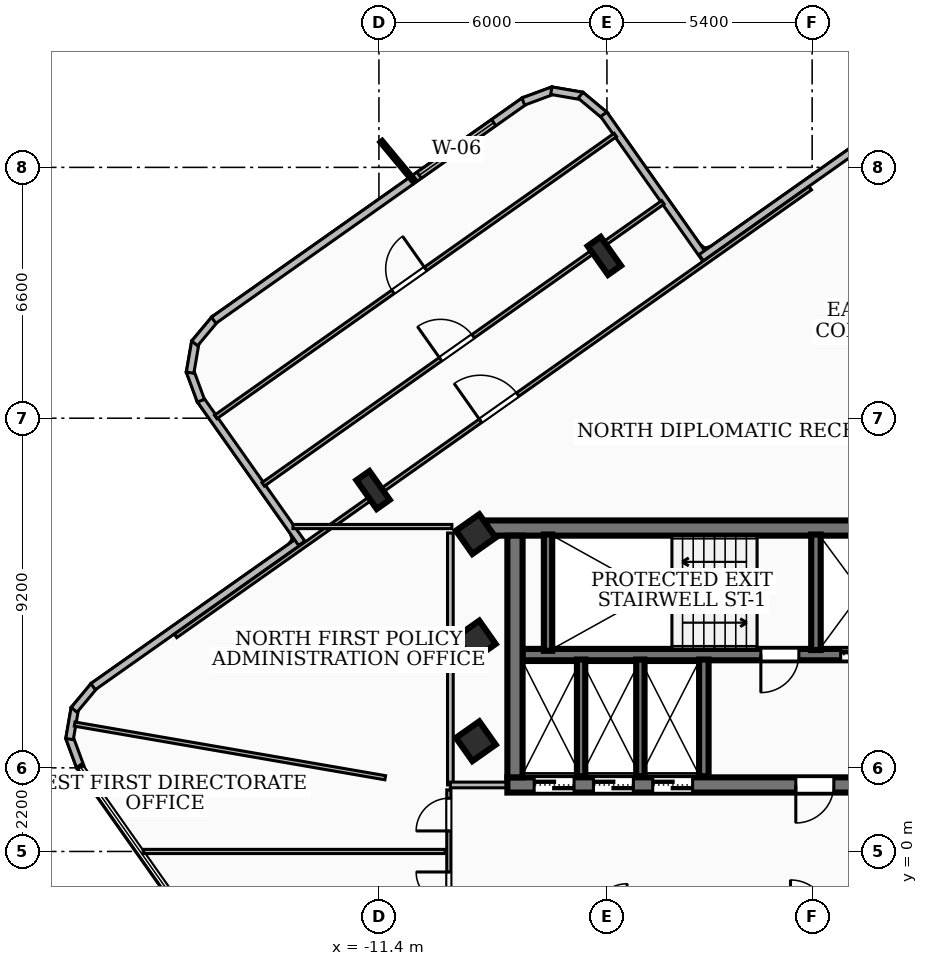
"""IFC4 building model, lengths in metres.
Left out: names, types, materials, properties, quantities, classifications, styles, units other than length and angle.
Written with IfcOpenShell. Run it as: python <this file> out.ifc"""

import sys

from ifc_helpers import new_model, si_unit, direction, frame, frame_2d, origin, origin_2d, place, context, subcontext, project, spatial, rectangle, i_section, extrude, element, fill, save


model = new_model("IFC4")
c1 = context("Model", 3, precision=1e-05, world=origin(), true_north=direction((0.0, 1.0)))
c2 = subcontext(c1, "Body", "Model", "MODEL_VIEW")
j1 = project(units=[si_unit("LENGTHUNIT", "METRE"), si_unit("PLANEANGLEUNIT", "RADIAN")], contexts=[c1])
p1 = place(None, origin())
s1 = spatial("IfcSite", under=j1, at=p1, CompositionType="ELEMENT")
p2 = place(p1, origin())
s2 = spatial("IfcBuilding", under=s1, at=p2, CompositionType="ELEMENT")
p3 = place(p2, frame((0.0, 0.0, 222.3)))
s3 = spatial("IfcBuildingStorey", under=s2, at=p3, CompositionType="ELEMENT", Elevation=222.3)
p4 = place(p3, frame((-8.78, 8.51, 0.0), z_axis=(0.0, 0.0, 1.0), x_axis=(1.0, 0.0, 0.0)))
e1 = element("IfcWall", 1, at=p4, inside=s3, PredefinedType="SHEAR", context=c2, shape_type="SweptSolid", body=[
    extrude(rectangle(XDim=17.56, YDim=0.4, at=frame_2d((8.78, 0.0))), origin(), (0.0, 0.0, 1.0), 3.14),
])
p5 = place(p3, frame((8.02, 1.75, 0.0), z_axis=(0.0, 0.0, 1.0), x_axis=(-1.0, 0.0, 0.0)))
e2 = element("IfcWall", 2, at=p5, inside=s3, PredefinedType="SHEAR", context=c2, shape_type="SweptSolid", body=[
    extrude(rectangle(XDim=16.04, YDim=0.4, at=frame_2d((8.02, 0.0))), origin(), (0.0, 0.0, 1.0), 3.14),
])
p6 = place(p5, frame((7.45, 0.0, 0.0)))
e3 = element("IfcOpeningElement", 3, at=p6, cuts=e2, PredefinedType="OPENING", context=c2, shape_type="SweptSolid", body=[
    extrude(rectangle(XDim=1.0, YDim=2.1, at=frame_2d((0.5, 1.05))), frame((0.0, 0.21, 0.0), z_axis=(0.0, -1.0, 0.0), x_axis=(1.0, 0.0, 0.0)), (0.0, 0.0, 1.0), 0.42),
])
p7 = place(p5, frame((14.285, 0.0, 0.0)))
e4 = element("IfcOpeningElement", 4, at=p7, cuts=e2, PredefinedType="OPENING", context=c2, shape_type="SweptSolid", body=[
    extrude(rectangle(XDim=1.05, YDim=2.15, at=frame_2d((0.525, 1.075))), frame((0.0, 0.21, 0.0), z_axis=(0.0, -1.0, 0.0), x_axis=(1.0, 0.0, 0.0)), (0.0, 0.0, 1.0), 0.42),
])
p8 = place(p5, frame((12.725, 0.0, 0.0)))
e5 = element("IfcOpeningElement", 5, at=p8, cuts=e2, PredefinedType="OPENING", context=c2, shape_type="SweptSolid", body=[
    extrude(rectangle(XDim=1.05, YDim=2.15, at=frame_2d((0.525, 1.075))), frame((0.0, 0.21, 0.0), z_axis=(0.0, -1.0, 0.0), x_axis=(1.0, 0.0, 0.0)), (0.0, 0.0, 1.0), 0.42),
])
p9 = place(p5, frame((11.165, 0.0, 0.0)))
e6 = element("IfcOpeningElement", 6, at=p9, cuts=e2, PredefinedType="OPENING", context=c2, shape_type="SweptSolid", body=[
    extrude(rectangle(XDim=1.05, YDim=2.15, at=frame_2d((0.525, 1.075))), frame((0.0, 0.21, 0.0), z_axis=(0.0, -1.0, 0.0), x_axis=(1.0, 0.0, 0.0)), (0.0, 0.0, 1.0), 0.42),
])
p10 = place(p5, frame((3.4, 0.0, 0.0)))
e7 = element("IfcOpeningElement", 7, at=p10, cuts=e2, PredefinedType="OPENING", context=c2, shape_type="SweptSolid", body=[
    extrude(rectangle(XDim=0.9, YDim=2.06, at=frame_2d((0.45, 1.03))), frame((0.0, 0.21, 0.0), z_axis=(0.0, -1.0, 0.0), x_axis=(1.0, 0.0, 0.0)), (0.0, 0.0, 1.0), 0.42),
])
p11 = place(p5, frame((1.1, 0.0, 0.0)))
e8 = element("IfcOpeningElement", 8, at=p11, cuts=e2, PredefinedType="OPENING", context=c2, shape_type="SweptSolid", body=[
    extrude(rectangle(XDim=0.9, YDim=2.06, at=frame_2d((0.45, 1.03))), frame((0.0, 0.21, 0.0), z_axis=(0.0, -1.0, 0.0), x_axis=(1.0, 0.0, 0.0)), (0.0, 0.0, 1.0), 0.42),
])
p12 = place(p3, frame((-7.82, 1.95, 0.0), z_axis=(0.0, 0.0, 1.0), x_axis=(0.0, 1.0, 0.0)))
e9 = element("IfcWall", 9, at=p12, inside=s3, PredefinedType="SHEAR", context=c2, shape_type="SweptSolid", body=[
    extrude(rectangle(XDim=6.36, YDim=0.4, at=frame_2d((3.18, 0.0))), origin(), (0.0, 0.0, 1.0), 3.14),
])
p13 = place(p3, frame((7.62, 5.18, 0.0), z_axis=(0.0, 0.0, 1.0), x_axis=(-1.0, 0.0, 0.0)))
e10 = element("IfcWall", 10, at=p13, inside=s3, PredefinedType="SOLIDWALL", context=c2, shape_type="SweptSolid", body=[
    extrude(rectangle(XDim=15.24, YDim=0.3, at=frame_2d((7.62, 0.0))), origin(), (0.0, 0.0, 1.0), 3.14),
])
p14 = place(p13, frame((5.77, 0.0, 0.0)))
e11 = element("IfcOpeningElement", 11, at=p14, cuts=e10, PredefinedType="OPENING", context=c2, shape_type="SweptSolid", body=[
    extrude(rectangle(XDim=1.1, YDim=2.15, at=frame_2d((0.55, 1.075))), frame((0.0, 0.16, 0.0), z_axis=(0.0, -1.0, 0.0), x_axis=(1.0, 0.0, 0.0)), (0.0, 0.0, 1.0), 0.32),
])
p15 = place(p13, frame((2.97, 0.0, 0.0)))
e12 = element("IfcOpeningElement", 12, at=p15, cuts=e10, PredefinedType="OPENING", context=c2, shape_type="SweptSolid", body=[
    extrude(rectangle(XDim=1.1, YDim=2.15, at=frame_2d((0.55, 1.075))), frame((0.0, 0.16, 0.0), z_axis=(0.0, -1.0, 0.0), x_axis=(1.0, 0.0, 0.0)), (0.0, 0.0, 1.0), 0.32),
])
p16 = place(p13, frame((7.97, 0.0, 0.0)))
e13 = element("IfcOpeningElement", 13, at=p16, cuts=e10, PredefinedType="OPENING", context=c2, shape_type="SweptSolid", body=[
    extrude(rectangle(XDim=1.0, YDim=2.1, at=frame_2d((0.5, 1.05))), frame((0.0, 0.16, 0.0), z_axis=(0.0, -1.0, 0.0), x_axis=(1.0, 0.0, 0.0)), (0.0, 0.0, 1.0), 0.32),
])
p17 = place(p3, frame((-6.95, 5.28, 0.0), z_axis=(0.0, 0.0, 1.0), x_axis=(0.0, 1.0, 0.0)))
e14 = element("IfcWall", 14, at=p17, inside=s3, PredefinedType="SOLIDWALL", context=c2, shape_type="SweptSolid", body=[
    extrude(rectangle(XDim=3.06, YDim=0.22, at=frame_2d((1.53, 0.0))), origin(), (0.0, 0.0, 1.0), 3.14),
])
p18 = place(p3, frame((0.1, 5.3, 0.0), z_axis=(0.0, 0.0, 1.0), x_axis=(0.0, 1.0, 0.0)))
e15 = element("IfcWall", 15, at=p18, inside=s3, PredefinedType="SOLIDWALL", context=c2, shape_type="SweptSolid", body=[
    extrude(rectangle(XDim=3.04, YDim=0.25, at=frame_2d((1.52, 0.0))), origin(), (0.0, 0.0, 1.0), 3.14),
])
p19 = place(p3, frame((-2.85, 1.98, 0.0), z_axis=(0.0, 0.0, 1.0), x_axis=(0.0, 1.0, 0.0)))
e16 = element("IfcWall", 16, at=p19, inside=s3, PredefinedType="SOLIDWALL", context=c2, shape_type="SweptSolid", body=[
    extrude(rectangle(XDim=3.07, YDim=0.25, at=frame_2d((1.535, 0.0))), origin(), (0.0, 0.0, 1.0), 3.14),
])
for number, where, z_axis, x_axis in (
    (17, (-6.08, 1.98, 0.0), (0.0, 0.0, 1.0), (0.0, 1.0, 0.0)),
    (18, (-4.52, 1.98, 0.0), (0.0, 0.0, 1.0), (0.0, 1.0, 0.0)),
):
    element("IfcWall", number, at=place(p3, frame(where, z_axis=z_axis, x_axis=x_axis)), inside=s3, PredefinedType="SOLIDWALL", context=c2, shape_type="SweptSolid", body=[
        extrude(rectangle(XDim=3.07, YDim=0.22, at=frame_2d((1.535, 0.0))), origin(), (0.0, 0.0, 1.0), 3.14),
    ])
for number, where, z_axis, x_axis in (
    (19, (-8.85, 2.9, 0.0), (0.0, 0.0, 1.0), (0.817, 0.576, 0.0)),
    (20, (-8.85, 5.55, 0.0), (0.0, 0.0, 1.0), (0.817, 0.576, 0.0)),
    (21, (-8.85, 8.35, 0.0), (0.0, 0.0, 1.0), (0.817, 0.576, 0.0)),
):
    element("IfcColumn", number, at=place(p3, frame(where, z_axis=z_axis, x_axis=x_axis)), inside=s3, PredefinedType="COLUMN", context=c2, shape_type="SweptSolid", body=[
        extrude(rectangle(XDim=0.75, YDim=0.75, at=origin_2d()), origin(), (0.0, 0.0, 1.0), 3.42),
    ])
for number, where, z_axis, x_axis in (
    (22, (-5.468, 15.671, 0.0), (0.0, 0.0, 1.0), (0.817, 0.576, 0.0)),
    (23, (-11.554, 9.51, 0.0), (0.0, 0.0, 1.0), (0.817, 0.576, 0.0)),
):
    element("IfcColumn", number, at=place(p3, frame(where, z_axis=z_axis, x_axis=x_axis)), inside=s3, PredefinedType="COLUMN", context=c2, shape_type="SweptSolid", body=[
        extrude(i_section(OverallWidth=0.418, OverallDepth=0.927, WebThickness=0.019, FlangeThickness=0.032, at=origin_2d()), origin(), (0.0, 0.0, 1.0), 3.42),
    ])
p20 = place(p3, frame((-19.256, 2.219, 0.0), z_axis=(0.0, 0.0, 1.0), x_axis=(-0.345975487894, 0.938243551417, 0.0)))
e24 = element("IfcWall", 24, at=p20, inside=s3, PredefinedType="SOLIDWALL", context=c2, shape_type="SweptSolid", body=[
    extrude(rectangle(XDim=0.838, YDim=0.2, at=frame_2d((0.419, 0.0))), origin(), (0.0, 0.0, 1.0), 3.14),
])
p21 = place(p3, frame((-19.541, 2.957, 0.0), z_axis=(0.0, 0.0, 1.0), x_axis=(0.169867275979, 0.985466949497, 0.0)))
e25 = element("IfcWall", 25, at=p21, inside=s3, PredefinedType="SOLIDWALL", context=c2, shape_type="SweptSolid", body=[
    extrude(rectangle(XDim=0.825, YDim=0.2, at=frame_2d((0.413, 0.0))), origin(), (0.0, 0.0, 1.0), 3.14),
])
p22 = place(p3, frame((-19.421, 3.726, 0.0), z_axis=(0.0, 0.0, 1.0), x_axis=(0.639610986305, 0.768698761673, 0.0)))
e26 = element("IfcWall", 26, at=p22, inside=s3, PredefinedType="SOLIDWALL", context=c2, shape_type="SweptSolid", body=[
    extrude(rectangle(XDim=0.838, YDim=0.2, at=frame_2d((0.419, 0.0))), origin(), (0.0, 0.0, 1.0), 3.14),
])
p23 = place(p3, frame((-18.921, 4.337, 0.0), z_axis=(0.0, 0.0, 1.0), x_axis=(0.817167578816, 0.576400163196, 0.0)))
e27 = element("IfcWall", 27, at=p23, inside=s3, PredefinedType="SOLIDWALL", context=c2, shape_type="SweptSolid", body=[
    extrude(rectangle(XDim=6.74, YDim=0.2, at=frame_2d((3.37, 0.0))), origin(), (0.0, 0.0, 1.0), 3.14),
])
p24 = place(p3, frame((-13.432, 8.111, 0.0), z_axis=(0.0, 0.0, 1.0), x_axis=(-0.576445639344, 0.817135499707, 0.0)))
e28 = element("IfcWall", 28, at=p24, inside=s3, PredefinedType="SOLIDWALL", context=c2, shape_type="SweptSolid", body=[
    extrude(rectangle(XDim=4.641, YDim=0.2, at=frame_2d((2.32, 0.0))), origin(), (0.0, 0.0, 1.0), 3.14),
])
p25 = place(p3, frame((-16.084, 11.86, 0.0), z_axis=(0.0, 0.0, 1.0), x_axis=(-0.346232030844, 0.938148911857, 0.0)))
e29 = element("IfcWall", 29, at=p25, inside=s3, PredefinedType="SOLIDWALL", context=c2, shape_type="SweptSolid", body=[
    extrude(rectangle(XDim=0.838, YDim=0.2, at=frame_2d((0.419, 0.0))), origin(), (0.0, 0.0, 1.0), 3.14),
])
p26 = place(p3, frame((-16.369, 12.598, 0.0), z_axis=(0.0, 0.0, 1.0), x_axis=(0.169332910212, 0.985558910223, 0.0)))
e30 = element("IfcWall", 30, at=p26, inside=s3, PredefinedType="SOLIDWALL", context=c2, shape_type="SweptSolid", body=[
    extrude(rectangle(XDim=0.826, YDim=0.2, at=frame_2d((0.413, 0.0))), origin(), (0.0, 0.0, 1.0), 3.14),
])
p27 = place(p3, frame((-16.249, 13.368, 0.0), z_axis=(0.0, 0.0, 1.0), x_axis=(0.641043819012, 0.76750428149, 0.0)))
e31 = element("IfcWall", 31, at=p27, inside=s3, PredefinedType="SOLIDWALL", context=c2, shape_type="SweptSolid", body=[
    extrude(rectangle(XDim=0.838, YDim=0.2, at=frame_2d((0.419, 0.0))), origin(), (0.0, 0.0, 1.0), 3.14),
])
p28 = place(p3, frame((-15.748, 13.978, 0.0), z_axis=(0.0, 0.0, 1.0), x_axis=(0.817168991675, 0.576398160168, 0.0)))
e32 = element("IfcWall", 32, at=p28, inside=s3, PredefinedType="SOLIDWALL", context=c2, shape_type="SweptSolid", body=[
    extrude(rectangle(XDim=10.022, YDim=0.2, at=frame_2d((5.011, 0.0))), origin(), (0.0, 0.0, 1.0), 3.14),
])
p29 = place(p28, frame((6.618, 0.0, 0.85)))
e33 = element("IfcOpeningElement", 33, at=p29, cuts=e32, PredefinedType="OPENING", context=c2, shape_type="SweptSolid", body=[
    extrude(rectangle(XDim=2.4, YDim=1.85, at=frame_2d((1.2, 0.925))), frame((0.0, 0.11, 0.0), z_axis=(0.0, -1.0, 0.0), x_axis=(1.0, 0.0, 0.0)), (0.0, 0.0, 1.0), 0.22),
])
p30 = place(p3, frame((-7.601, 19.732, 0.0), z_axis=(0.0, 0.0, 1.0), x_axis=(0.937664324164, 0.347542249504, 0.0)))
e34 = element("IfcWall", 34, at=p30, inside=s3, PredefinedType="SOLIDWALL", context=c2, shape_type="SweptSolid", body=[
    extrude(rectangle(XDim=0.837, YDim=0.2, at=frame_2d((0.419, 0.0))), origin(), (0.0, 0.0, 1.0), 3.14),
])
p31 = place(p3, frame((-6.864, 20.018, 0.0), z_axis=(0.0, 0.0, 1.0), x_axis=(0.985501046628, -0.16966934636, 0.0)))
e35 = element("IfcWall", 35, at=p31, inside=s3, PredefinedType="SOLIDWALL", context=c2, shape_type="SweptSolid", body=[
    extrude(rectangle(XDim=0.826, YDim=0.2, at=frame_2d((0.413, 0.0))), origin(), (0.0, 0.0, 1.0), 3.14),
])
p32 = place(p3, frame((-6.094, 19.898, 0.0), z_axis=(0.0, 0.0, 1.0), x_axis=(0.767647650908, -0.640872127694, 0.0)))
e36 = element("IfcWall", 36, at=p32, inside=s3, PredefinedType="SOLIDWALL", context=c2, shape_type="SweptSolid", body=[
    extrude(rectangle(XDim=0.838, YDim=0.2, at=frame_2d((0.419, 0.0))), origin(), (0.0, 0.0, 1.0), 3.14),
])
p33 = place(p3, frame((-5.484, 19.397, 0.0), z_axis=(0.0, 0.0, 1.0), x_axis=(0.576451897958, -0.817131084551, 0.0)))
e37 = element("IfcWall", 37, at=p33, inside=s3, PredefinedType="SOLIDWALL", context=c2, shape_type="SweptSolid", body=[
    extrude(rectangle(XDim=4.642, YDim=0.2, at=frame_2d((2.321, 0.0))), origin(), (0.0, 0.0, 1.0), 3.14),
])
p34 = place(p3, frame((-2.919, 15.623, 0.0), z_axis=(0.0, 0.0, 1.0), x_axis=(0.817050016192, 0.576566796686, 0.0)))
e38 = element("IfcWall", 38, at=p34, inside=s3, PredefinedType="SOLIDWALL", context=c2, shape_type="SweptSolid", body=[
    extrude(rectangle(XDim=6.341, YDim=0.2, at=frame_2d((3.17, 0.0))), origin(), (0.0, 0.0, 1.0), 3.14),
])
p35 = place(p3, frame((-9.52, 1.75, 0.0), z_axis=(0.0, 0.0, 1.0), x_axis=(0.0, 1.0, 0.0)))
e39 = element("IfcWall", 39, at=p35, inside=s3, PredefinedType="PARTITIONING", context=c2, shape_type="SweptSolid", body=[
    extrude(rectangle(XDim=6.63, YDim=0.15, at=frame_2d((3.315, 0.0))), origin(), (0.0, 0.0, 1.0), 3.14),
])
p36 = place(p3, frame((-7.85, 1.75, 0.0), z_axis=(0.0, 0.0, 1.0), x_axis=(-1.0, 0.0, 0.0)))
e40 = element("IfcWall", 40, at=p36, inside=s3, PredefinedType="PARTITIONING", context=c2, shape_type="SweptSolid", body=[
    extrude(rectangle(XDim=1.67, YDim=0.15, at=frame_2d((0.835, 0.0))), origin(), (0.0, 0.0, 1.0), 2.37),
])
p37 = place(p3, frame((-17.604, 0.0, 0.0), z_axis=(0.0, 0.0, 1.0), x_axis=(1.0, 0.0, 0.0)))
e41 = element("IfcWall", 41, at=p37, inside=s3, PredefinedType="PARTITIONING", context=c2, shape_type="SweptSolid", body=[
    extrude(rectangle(XDim=7.944, YDim=0.11, at=frame_2d((3.972, 0.0))), origin(), (0.0, 0.0, 1.0), 3.14),
])
p38 = place(p3, frame((-13.662, 8.55, 0.0), z_axis=(0.0, 0.0, 1.0), x_axis=(1.0, 0.0, 0.0)))
e42 = element("IfcWall", 42, at=p38, inside=s3, PredefinedType="PARTITIONING", context=c2, shape_type="SweptSolid", body=[
    extrude(rectangle(XDim=4.182, YDim=0.11, at=frame_2d((2.091, 0.0))), origin(), (0.0, 0.0, 1.0), 2.51),
])
p39 = place(p3, frame((-9.56, -1.62, 0.0), z_axis=(0.0, 0.0, 1.0), x_axis=(0.0, 1.0, 0.0)))
e43 = element("IfcWall", 43, at=p39, inside=s3, PredefinedType="PARTITIONING", context=c2, shape_type="SweptSolid", body=[
    extrude(rectangle(XDim=3.24, YDim=0.11, at=frame_2d((1.62, 0.0))), origin(), (0.0, 0.0, 1.0), 3.14),
])
p40 = place(p39, frame((0.22, 0.0, 0.0)))
e44 = element("IfcOpeningElement", 44, at=p40, cuts=e43, PredefinedType="OPENING", context=c2, shape_type="SweptSolid", body=[
    extrude(rectangle(XDim=0.86, YDim=2.04, at=frame_2d((0.43, 1.02))), frame((0.0, 0.065, 0.0), z_axis=(0.0, -1.0, 0.0), x_axis=(1.0, 0.0, 0.0)), (0.0, 0.0, 1.0), 0.13),
])
p41 = place(p39, frame((2.16, 0.0, 0.0)))
e45 = element("IfcOpeningElement", 45, at=p41, cuts=e43, PredefinedType="OPENING", context=c2, shape_type="SweptSolid", body=[
    extrude(rectangle(XDim=0.86, YDim=2.04, at=frame_2d((0.43, 1.02))), frame((0.0, 0.065, 0.0), z_axis=(0.0, -1.0, 0.0), x_axis=(1.0, 0.0, 0.0)), (0.0, 0.0, 1.0), 0.13),
])
p42 = place(p3, frame((-11.234, 1.94, 0.0), z_axis=(0.0, 0.0, 1.0), x_axis=(-0.985400402951, 0.170252887973, 0.0)))
e46 = element("IfcWall", 46, at=p42, inside=s3, PredefinedType="PARTITIONING", context=c2, shape_type="SweptSolid", body=[
    extrude(rectangle(XDim=8.294, YDim=0.11, at=frame_2d((4.147, 0.0))), origin(), (0.0, 0.0, 1.0), 3.14),
])
p43 = place(p3, frame((-16.752, 5.671, 0.0), z_axis=(0.0, 0.0, 1.0), x_axis=(0.81715881447, 0.576412588285, 0.0)))
e47 = element("IfcWall", 47, at=p43, inside=s3, PredefinedType="PARTITIONING", context=c2, shape_type="SweptSolid", body=[
    extrude(rectangle(XDim=20.44, YDim=0.11, at=frame_2d((10.22, 0.0))), origin(), (0.0, 0.0, 1.0), 2.51),
])
p44 = place(p43, frame((9.82, 0.0, 0.0)))
e48 = element("IfcOpeningElement", 48, at=p44, cuts=e47, PredefinedType="OPENING", context=c2, shape_type="SweptSolid", body=[
    extrude(rectangle(XDim=1.2, YDim=2.1, at=frame_2d((0.6, 1.05))), frame((0.0, 0.065, 0.0), z_axis=(0.0, -1.0, 0.0), x_axis=(1.0, 0.0, 0.0)), (0.0, 0.0, 1.0), 0.13),
])
p45 = place(p3, frame((-14.445, 9.66, 0.0), z_axis=(0.0, 0.0, 1.0), x_axis=(0.817137627016, 0.576442623784, 0.0)))
e49 = element("IfcWall", 49, at=p45, inside=s3, PredefinedType="PARTITIONING", context=c2, shape_type="SweptSolid", body=[
    extrude(rectangle(XDim=12.871, YDim=0.11, at=frame_2d((6.435, 0.0))), origin(), (0.0, 0.0, 1.0), 3.14),
])
p46 = place(p45, frame((5.71, 0.0, 0.0)))
e50 = element("IfcOpeningElement", 50, at=p46, cuts=e49, PredefinedType="OPENING", context=c2, shape_type="SweptSolid", body=[
    extrude(rectangle(XDim=1.05, YDim=2.08, at=frame_2d((0.525, 1.04))), frame((0.0, 0.065, 0.0), z_axis=(0.0, -1.0, 0.0), x_axis=(1.0, 0.0, 0.0)), (0.0, 0.0, 1.0), 0.13),
])
p47 = place(p3, frame((-15.695, 11.433, 0.0), z_axis=(0.0, 0.0, 1.0), x_axis=(0.817121348165, 0.576465699216, 0.0)))
e51 = element("IfcWall", 51, at=p47, inside=s3, PredefinedType="PARTITIONING", context=c2, shape_type="SweptSolid", body=[
    extrude(rectangle(XDim=12.87, YDim=0.11, at=frame_2d((6.435, 0.0))), origin(), (0.0, 0.0, 1.0), 3.14),
])
p48 = place(p47, frame((5.709, 0.0, 0.0)))
e52 = element("IfcOpeningElement", 52, at=p48, cuts=e51, PredefinedType="OPENING", context=c2, shape_type="SweptSolid", body=[
    extrude(rectangle(XDim=1.05, YDim=2.08, at=frame_2d((0.525, 1.04))), frame((0.0, 0.065, 0.0), z_axis=(0.0, -1.0, 0.0), x_axis=(1.0, 0.0, 0.0)), (0.0, 0.0, 1.0), 0.13),
])
p49 = place(p29, origin())
e53 = element("IfcWindow", 53, at=p49, inside=s3, PartitioningType="SINGLE_PANEL", PredefinedType="WINDOW", context=c2, shape_type="SweptSolid", body=[
    extrude(rectangle(XDim=2.4, YDim=1.85, at=frame_2d((1.2, 0.925))), frame((0.0, 0.03, 0.0), z_axis=(0.0, -1.0, 0.0), x_axis=(1.0, 0.0, 0.0)), (0.0, 0.0, 1.0), 0.06),
])
fill(e33, e53)
p50 = place(p6, origin())
e54 = element("IfcDoor", 54, at=p50, inside=s3, OperationType="SINGLE_SWING_RIGHT", PredefinedType="DOOR", context=c2, shape_type="SweptSolid", body=[
    extrude(rectangle(XDim=1.0, YDim=2.1, at=frame_2d((0.5, 1.05))), frame((0.0, 0.025, 0.0), z_axis=(0.0, -1.0, 0.0), x_axis=(1.0, 0.0, 0.0)), (0.0, 0.0, 1.0), 0.05),
])
fill(e3, e54)
p51 = place(p14, origin())
e55 = element("IfcDoor", 55, at=p51, inside=s3, OperationType="DOUBLE_DOOR_SLIDING", PredefinedType="DOOR", context=c2, shape_type="SweptSolid", body=[
    extrude(rectangle(XDim=1.1, YDim=2.15, at=frame_2d((0.55, 1.075))), frame((0.0, 0.025, 0.0), z_axis=(0.0, -1.0, 0.0), x_axis=(1.0, 0.0, 0.0)), (0.0, 0.0, 1.0), 0.05),
])
fill(e11, e55)
p52 = place(p16, origin())
e56 = element("IfcDoor", 56, at=p52, inside=s3, OperationType="SINGLE_SWING_RIGHT", PredefinedType="DOOR", context=c2, shape_type="SweptSolid", body=[
    extrude(rectangle(XDim=1.0, YDim=2.1, at=frame_2d((0.5, 1.05))), frame((0.0, 0.025, 0.0), z_axis=(0.0, -1.0, 0.0), x_axis=(1.0, 0.0, 0.0)), (0.0, 0.0, 1.0), 0.05),
])
fill(e13, e56)
p53 = place(p7, origin())
e57 = element("IfcDoor", 57, at=p53, inside=s3, OperationType="DOUBLE_DOOR_SLIDING", PredefinedType="DOOR", context=c2, shape_type="SweptSolid", body=[
    extrude(rectangle(XDim=1.05, YDim=2.15, at=frame_2d((0.525, 1.075))), frame((0.0, 0.025, 0.0), z_axis=(0.0, -1.0, 0.0), x_axis=(1.0, 0.0, 0.0)), (0.0, 0.0, 1.0), 0.05),
])
fill(e4, e57)
p54 = place(p8, origin())
e58 = element("IfcDoor", 58, at=p54, inside=s3, OperationType="DOUBLE_DOOR_SLIDING", PredefinedType="DOOR", context=c2, shape_type="SweptSolid", body=[
    extrude(rectangle(XDim=1.05, YDim=2.15, at=frame_2d((0.525, 1.075))), frame((0.0, 0.025, 0.0), z_axis=(0.0, -1.0, 0.0), x_axis=(1.0, 0.0, 0.0)), (0.0, 0.0, 1.0), 0.05),
])
fill(e5, e58)
p55 = place(p9, origin())
e59 = element("IfcDoor", 59, at=p55, inside=s3, OperationType="DOUBLE_DOOR_SLIDING", PredefinedType="DOOR", context=c2, shape_type="SweptSolid", body=[
    extrude(rectangle(XDim=1.05, YDim=2.15, at=frame_2d((0.525, 1.075))), frame((0.0, 0.025, 0.0), z_axis=(0.0, -1.0, 0.0), x_axis=(1.0, 0.0, 0.0)), (0.0, 0.0, 1.0), 0.05),
])
fill(e6, e59)
p56 = place(p40, origin())
e60 = element("IfcDoor", 60, at=p56, inside=s3, OperationType="SINGLE_SWING_RIGHT", PredefinedType="DOOR", context=c2, shape_type="SweptSolid", body=[
    extrude(rectangle(XDim=0.86, YDim=2.04, at=frame_2d((0.43, 1.02))), frame((0.0, 0.025, 0.0), z_axis=(0.0, -1.0, 0.0), x_axis=(1.0, 0.0, 0.0)), (0.0, 0.0, 1.0), 0.05),
])
fill(e44, e60)
p57 = place(p41, origin())
e61 = element("IfcDoor", 61, at=p57, inside=s3, OperationType="SINGLE_SWING_LEFT", PredefinedType="DOOR", context=c2, shape_type="SweptSolid", body=[
    extrude(rectangle(XDim=0.86, YDim=2.04, at=frame_2d((0.43, 1.02))), frame((0.0, 0.025, 0.0), z_axis=(0.0, -1.0, 0.0), x_axis=(1.0, 0.0, 0.0)), (0.0, 0.0, 1.0), 0.05),
])
fill(e45, e61)
p58 = place(p44, origin())
e62 = element("IfcDoor", 62, at=p58, inside=s3, OperationType="SINGLE_SWING_LEFT", PredefinedType="DOOR", context=c2, shape_type="SweptSolid", body=[
    extrude(rectangle(XDim=1.2, YDim=2.1, at=frame_2d((0.6, 1.05))), frame((0.0, 0.025, 0.0), z_axis=(0.0, -1.0, 0.0), x_axis=(1.0, 0.0, 0.0)), (0.0, 0.0, 1.0), 0.05),
])
fill(e48, e62)
p59 = place(p46, origin())
e63 = element("IfcDoor", 63, at=p59, inside=s3, OperationType="SINGLE_SWING_LEFT", PredefinedType="DOOR", context=c2, shape_type="SweptSolid", body=[
    extrude(rectangle(XDim=1.05, YDim=2.08, at=frame_2d((0.525, 1.04))), frame((0.0, 0.025, 0.0), z_axis=(0.0, -1.0, 0.0), x_axis=(1.0, 0.0, 0.0)), (0.0, 0.0, 1.0), 0.05),
])
fill(e50, e63)
p60 = place(p48, origin())
e64 = element("IfcDoor", 64, at=p60, inside=s3, OperationType="SINGLE_SWING_RIGHT", PredefinedType="DOOR", context=c2, shape_type="SweptSolid", body=[
    extrude(rectangle(XDim=1.05, YDim=2.08, at=frame_2d((0.525, 1.04))), frame((0.0, 0.025, 0.0), z_axis=(0.0, -1.0, 0.0), x_axis=(1.0, 0.0, 0.0)), (0.0, 0.0, 1.0), 0.05),
])
fill(e52, e64)
save(model, sys.argv[1])
